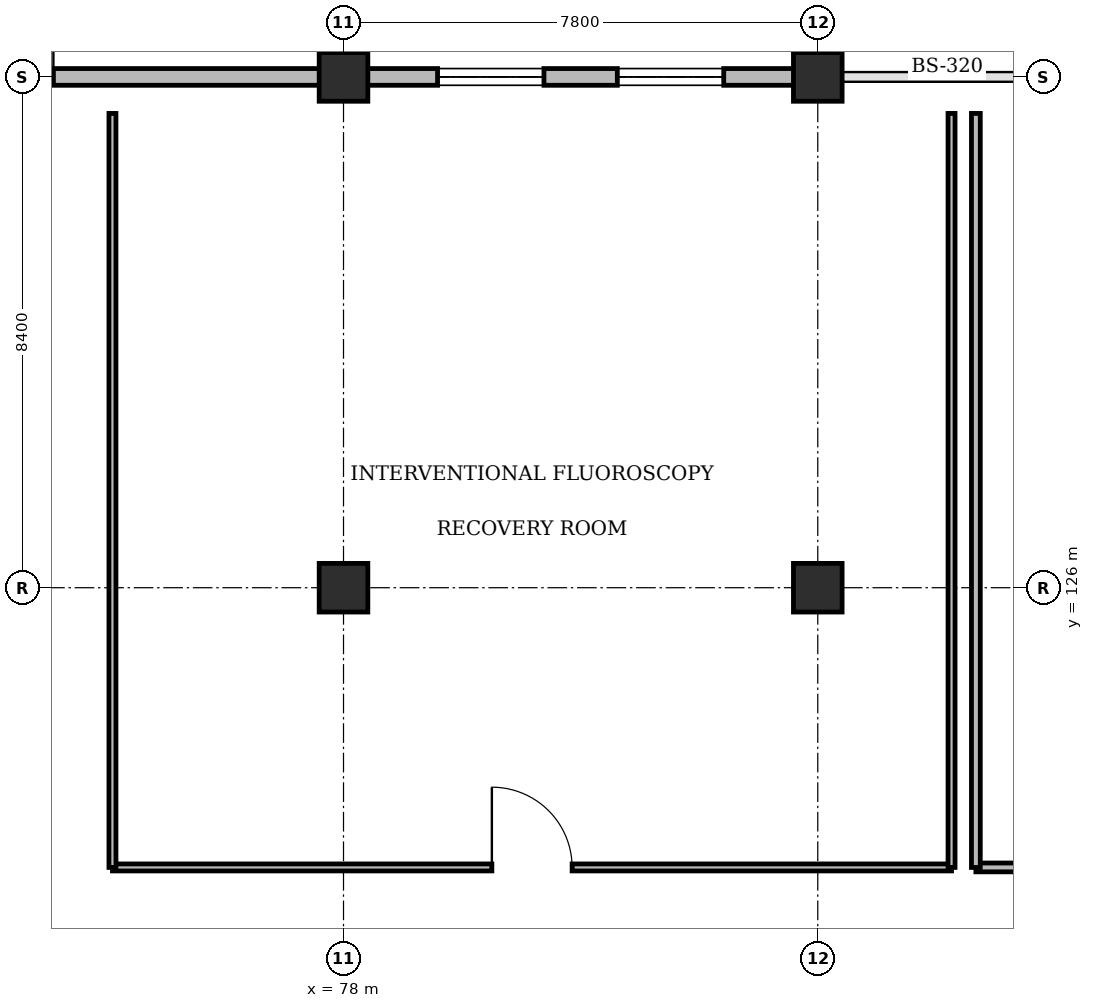
"""IFC4 building model, lengths in metres.
Left out: names, types, materials, properties, quantities, classifications, styles, units other than length and angle.
Written with IfcOpenShell. Run it as: python <this file> out.ifc"""

import sys

from ifc_helpers import new_model, si_unit, direction, frame, frame_2d, origin, origin_2d, place, context, subcontext, project, spatial, rectangle, extrude, element, fill, save


model = new_model("IFC4")
c1 = context("Model", 3, precision=1e-05, world=origin(), true_north=direction((0.0, 1.0)))
c2 = subcontext(c1, "Body", "Model", "MODEL_VIEW")
j1 = project(units=[si_unit("LENGTHUNIT", "METRE"), si_unit("PLANEANGLEUNIT", "RADIAN")], contexts=[c1])
p1 = place(None, origin())
s1 = spatial("IfcSite", under=j1, at=p1, CompositionType="ELEMENT")
p2 = place(p1, origin())
s2 = spatial("IfcBuilding", under=s1, at=p2, CompositionType="ELEMENT")
p3 = place(p2, origin())
s3 = spatial("IfcBuildingStorey", under=s2, at=p3, CompositionType="ELEMENT", Elevation=0.0)
for number, where, z_axis, x_axis in (
    (1, (78.0, 126.0, 0.0), (0.0, 0.0, 1.0), (1.0, 0.0, 0.0)),
    (2, (78.0, 134.4, 0.0), (0.0, 0.0, 1.0), (1.0, 0.0, 0.0)),
    (3, (85.8, 126.0, 0.0), (0.0, 0.0, 1.0), (1.0, 0.0, 0.0)),
    (4, (85.8, 134.4, 0.0), (0.0, 0.0, 1.0), (1.0, 0.0, 0.0)),
):
    element("IfcColumn", number, at=place(p3, frame(where, z_axis=z_axis, x_axis=x_axis)), inside=s3, PredefinedType="COLUMN", context=c2, shape_type="SweptSolid", body=[
        extrude(rectangle(XDim=0.8, YDim=0.8, at=origin_2d()), origin(), (0.0, 0.0, 1.0), 4.8),
    ])
p4 = place(p3, frame((70.54, 134.4, 0.0), z_axis=(0.0, 0.0, 1.0), x_axis=(1.0, 0.0, 0.0)))
e5 = element("IfcWall", 5, at=p4, inside=s3, PredefinedType="STANDARD", context=c2, shape_type="SweptSolid", body=[
    extrude(rectangle(XDim=7.12, YDim=0.275, at=frame_2d((3.56, 0.0))), origin(), (0.0, 0.0, 1.0), 3.63),
])
p5 = place(p4, frame((0.729, 0.0, 0.0)))
e6 = element("IfcOpeningElement", 6, at=p5, cuts=e5, PredefinedType="OPENING", context=c2, shape_type="SweptSolid", body=[
    extrude(rectangle(XDim=1.96, YDim=2.2, at=frame_2d((0.98, 1.1))), frame((0.0, 0.147, 0.0), z_axis=(0.0, -1.0, 0.0), x_axis=(1.0, 0.0, 0.0)), (0.0, 0.0, 1.0), 0.295),
])
p6 = place(p3, frame((78.34, 134.4, 0.0), z_axis=(0.0, 0.0, 1.0), x_axis=(1.0, 0.0, 0.0)))
e7 = element("IfcWall", 7, at=p6, inside=s3, PredefinedType="STANDARD", context=c2, shape_type="SweptSolid", body=[
    extrude(rectangle(XDim=7.12, YDim=0.275, at=frame_2d((3.56, 0.0))), origin(), (0.0, 0.0, 1.0), 3.63),
])
p7 = place(p6, frame((1.207, 0.0, 0.9)))
e8 = element("IfcOpeningElement", 8, at=p7, cuts=e7, PredefinedType="OPENING", context=c2, shape_type="SweptSolid", body=[
    extrude(rectangle(XDim=1.75, YDim=1.25, at=frame_2d((0.875, 0.625))), frame((0.0, 0.147, 0.0), z_axis=(0.0, -1.0, 0.0), x_axis=(1.0, 0.0, 0.0)), (0.0, 0.0, 1.0), 0.295),
])
p8 = place(p6, frame((4.163, 0.0, 0.9)))
e9 = element("IfcOpeningElement", 9, at=p8, cuts=e7, PredefinedType="OPENING", context=c2, shape_type="SweptSolid", body=[
    extrude(rectangle(XDim=1.75, YDim=1.25, at=frame_2d((0.875, 0.625))), frame((0.0, 0.147, 0.0), z_axis=(0.0, -1.0, 0.0), x_axis=(1.0, 0.0, 0.0)), (0.0, 0.0, 1.0), 0.295),
])
p9 = place(p3, frame((74.2, 121.4, 0.0), z_axis=(0.0, 0.0, 1.0), x_axis=(1.0, 0.0, 0.0)))
e10 = element("IfcWall", 10, at=p9, inside=s3, PredefinedType="PARTITIONING", context=c2, shape_type="SweptSolid", body=[
    extrude(rectangle(XDim=13.8, YDim=0.115, at=frame_2d((6.9, 0.0))), origin(), (0.0, 0.0, 1.0), 4.46),
])
p10 = place(p9, frame((6.24, 0.0, 0.0)))
e11 = element("IfcOpeningElement", 11, at=p10, cuts=e10, PredefinedType="OPENING", context=c2, shape_type="SweptSolid", body=[
    extrude(rectangle(XDim=1.32, YDim=2.15, at=frame_2d((0.66, 1.075))), frame((0.0, 0.067, 0.0), z_axis=(0.0, -1.0, 0.0), x_axis=(1.0, 0.0, 0.0)), (0.0, 0.0, 1.0), 0.135),
])
for number, where, z_axis, x_axis in (
    (12, (74.2, 121.4, 0.0), (0.0, 0.0, 1.0), (0.0, 1.0, 0.0)),
    (13, (88.0, 121.4, 0.0), (0.0, 0.0, 1.0), (0.0, 1.0, 0.0)),
):
    element("IfcWall", number, at=place(p3, frame(where, z_axis=z_axis, x_axis=x_axis)), inside=s3, PredefinedType="PARTITIONING", context=c2, shape_type="SweptSolid", body=[
        extrude(rectangle(XDim=12.4, YDim=0.115, at=frame_2d((6.2, 0.0))), origin(), (0.0, 0.0, 1.0), 4.46),
    ])
p11 = place(p3, frame((88.4, 121.4, 0.0), z_axis=(0.0, 0.0, 1.0), x_axis=(1.0, 0.0, 0.0)))
e14 = element("IfcWall", 14, at=p11, inside=s3, PredefinedType="PARTITIONING", context=c2, shape_type="SweptSolid", body=[
    extrude(rectangle(XDim=43.8, YDim=0.145, at=frame_2d((21.9, 0.0))), origin(), (0.0, 0.0, 1.0), 4.46),
])
p12 = place(p11, frame((21.325, 0.0, 0.0)))
e15 = element("IfcOpeningElement", 15, at=p12, cuts=e14, PredefinedType="OPENING", context=c2, shape_type="SweptSolid", body=[
    extrude(rectangle(XDim=1.15, YDim=2.15, at=frame_2d((0.575, 1.075))), frame((0.0, 0.083, 0.0), z_axis=(0.0, -1.0, 0.0), x_axis=(1.0, 0.0, 0.0)), (0.0, 0.0, 1.0), 0.165),
])
p13 = place(p3, frame((88.4, 121.4, 0.0), z_axis=(0.0, 0.0, 1.0), x_axis=(0.0, 1.0, 0.0)))
e16 = element("IfcWall", 16, at=p13, inside=s3, PredefinedType="PARTITIONING", context=c2, shape_type="SweptSolid", body=[
    extrude(rectangle(XDim=12.4, YDim=0.145, at=frame_2d((6.2, 0.0))), origin(), (0.0, 0.0, 1.0), 4.46),
])
p14 = place(p5, origin())
e17 = element("IfcDoor", 17, at=p14, inside=s3, OperationType="DOUBLE_DOOR_SINGLE_SWING", PredefinedType="DOOR", context=c2, shape_type="SweptSolid", body=[
    extrude(rectangle(XDim=1.96, YDim=2.2, at=frame_2d((0.98, 1.1))), frame((0.0, 0.025, 0.0), z_axis=(0.0, -1.0, 0.0), x_axis=(1.0, 0.0, 0.0)), (0.0, 0.0, 1.0), 0.05),
])
fill(e6, e17)
p15 = place(p7, origin())
e18 = element("IfcWindow", 18, at=p15, inside=s3, PartitioningType="SINGLE_PANEL", PredefinedType="WINDOW", context=c2, shape_type="SweptSolid", body=[
    extrude(rectangle(XDim=1.75, YDim=1.25, at=frame_2d((0.875, 0.625))), frame((0.0, 0.03, 0.0), z_axis=(0.0, -1.0, 0.0), x_axis=(1.0, 0.0, 0.0)), (0.0, 0.0, 1.0), 0.06),
])
fill(e8, e18)
p16 = place(p8, origin())
e19 = element("IfcWindow", 19, at=p16, inside=s3, PartitioningType="SINGLE_PANEL", PredefinedType="WINDOW", context=c2, shape_type="SweptSolid", body=[
    extrude(rectangle(XDim=1.75, YDim=1.25, at=frame_2d((0.875, 0.625))), frame((0.0, 0.03, 0.0), z_axis=(0.0, -1.0, 0.0), x_axis=(1.0, 0.0, 0.0)), (0.0, 0.0, 1.0), 0.06),
])
fill(e9, e19)
p17 = place(p10, origin())
e20 = element("IfcDoor", 20, at=p17, inside=s3, OperationType="SINGLE_SWING_LEFT", PredefinedType="DOOR", context=c2, shape_type="SweptSolid", body=[
    extrude(rectangle(XDim=1.32, YDim=2.15, at=frame_2d((0.66, 1.075))), frame((0.0, 0.025, 0.0), z_axis=(0.0, -1.0, 0.0), x_axis=(1.0, 0.0, 0.0)), (0.0, 0.0, 1.0), 0.05),
])
fill(e11, e20)
save(model, sys.argv[1])
